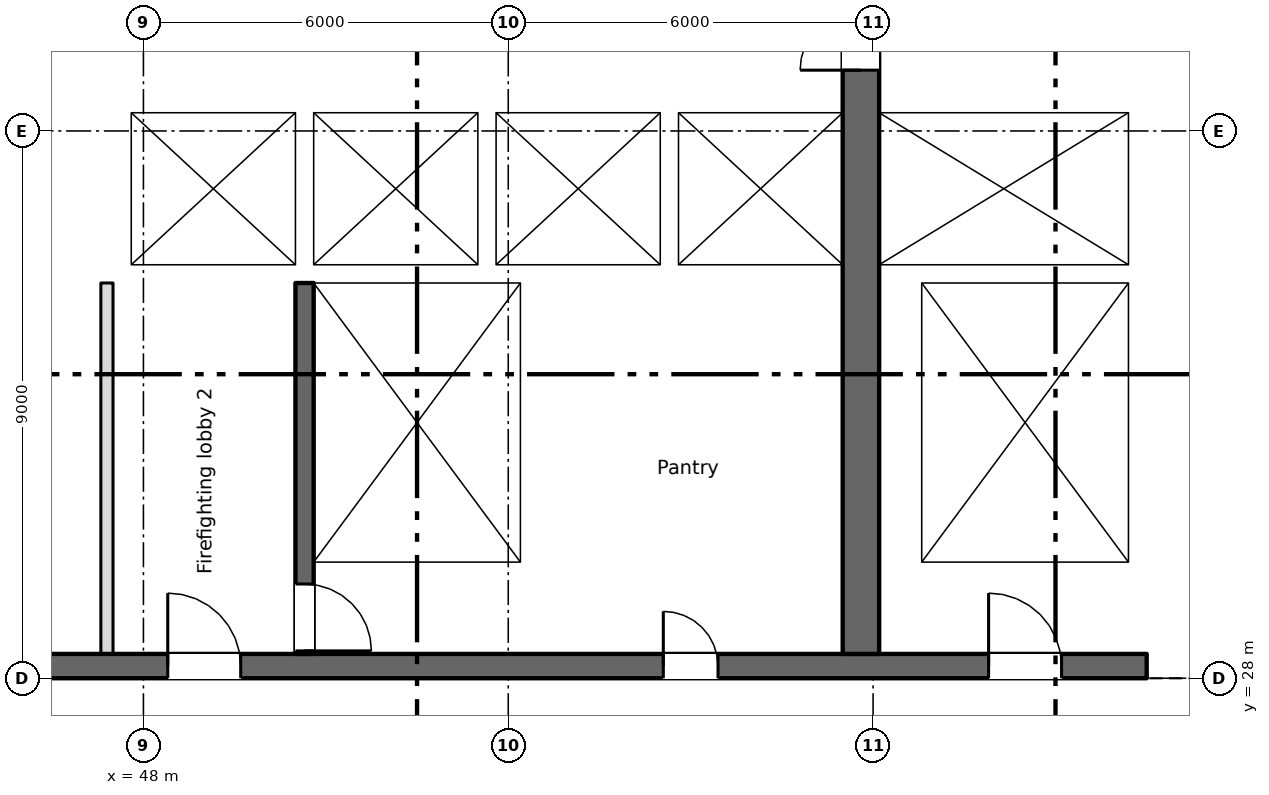
"""IFC4 building model, lengths in metres.
Left out: names, types, materials, properties, quantities, classifications, styles, units other than length and angle.
Written with IfcOpenShell. Run it as: python <this file> out.ifc"""

import sys

from ifc_helpers import new_model, si_unit, direction, frame, frame_2d, origin, place, context, subcontext, project, spatial, rectangle, extrude, element, fill, save


model = new_model("IFC4")
c1 = context("Model", 3, precision=1e-05, world=origin(), true_north=direction((0.0, 1.0)))
c2 = subcontext(c1, "Body", "Model", "MODEL_VIEW")
j1 = project(units=[si_unit("LENGTHUNIT", "METRE"), si_unit("PLANEANGLEUNIT", "RADIAN")], contexts=[c1])
p1 = place(None, origin())
s1 = spatial("IfcSite", under=j1, at=p1, CompositionType="ELEMENT")
p2 = place(p1, origin())
s2 = spatial("IfcBuilding", under=s1, at=p2, CompositionType="ELEMENT")
p3 = place(p2, frame((0.0, 0.0, 258.35)))
s3 = spatial("IfcBuildingStorey", under=s2, at=p3, CompositionType="ELEMENT", Elevation=258.35)
p4 = place(p3, frame((6.5, 28.2, 0.0), z_axis=(0.0, 0.0, 1.0), x_axis=(1.0, 0.0, 0.0)))
e1 = element("IfcWall", 1, at=p4, inside=s3, PredefinedType="SHEAR", context=c2, shape_type="SweptSolid", body=[
    extrude(rectangle(XDim=58.0, YDim=0.4, at=frame_2d((29.0, 0.0))), origin(), (0.0, 0.0, 1.0), 3.4),
])
p5 = place(p4, frame((12.762, 0.0, 0.0)))
e2 = element("IfcOpeningElement", 2, at=p5, cuts=e1, PredefinedType="OPENING", context=c2, shape_type="SweptSolid", body=[
    extrude(rectangle(XDim=0.9, YDim=2.1, at=frame_2d((0.45, 1.05))), frame((0.0, 0.21, 0.0), z_axis=(0.0, -1.0, 0.0), x_axis=(1.0, 0.0, 0.0)), (0.0, 0.0, 1.0), 0.42),
])
p6 = place(p4, frame((15.337, 0.0, 0.0)))
e3 = element("IfcOpeningElement", 3, at=p6, cuts=e1, PredefinedType="OPENING", context=c2, shape_type="SweptSolid", body=[
    extrude(rectangle(XDim=0.9, YDim=2.1, at=frame_2d((0.45, 1.05))), frame((0.0, 0.21, 0.0), z_axis=(0.0, -1.0, 0.0), x_axis=(1.0, 0.0, 0.0)), (0.0, 0.0, 1.0), 0.42),
])
p7 = place(p4, frame((50.05, 0.0, 0.0)))
e4 = element("IfcOpeningElement", 4, at=p7, cuts=e1, PredefinedType="OPENING", context=c2, shape_type="SweptSolid", body=[
    extrude(rectangle(XDim=0.9, YDim=2.1, at=frame_2d((0.45, 1.05))), frame((0.0, 0.21, 0.0), z_axis=(0.0, -1.0, 0.0), x_axis=(1.0, 0.0, 0.0)), (0.0, 0.0, 1.0), 0.42),
])
p8 = place(p4, frame((0.762, 0.0, 0.0)))
e5 = element("IfcOpeningElement", 5, at=p8, cuts=e1, PredefinedType="OPENING", context=c2, shape_type="SweptSolid", body=[
    extrude(rectangle(XDim=0.9, YDim=2.1, at=frame_2d((0.45, 1.05))), frame((0.0, 0.21, 0.0), z_axis=(0.0, -1.0, 0.0), x_axis=(1.0, 0.0, 0.0)), (0.0, 0.0, 1.0), 0.42),
])
p9 = place(p4, frame((2.337, 0.0, 0.0)))
e6 = element("IfcOpeningElement", 6, at=p9, cuts=e1, PredefinedType="OPENING", context=c2, shape_type="SweptSolid", body=[
    extrude(rectangle(XDim=0.9, YDim=2.1, at=frame_2d((0.45, 1.05))), frame((0.0, 0.21, 0.0), z_axis=(0.0, -1.0, 0.0), x_axis=(1.0, 0.0, 0.0)), (0.0, 0.0, 1.0), 0.42),
])
p10 = place(p4, frame((4.9, 0.0, 0.0)))
e7 = element("IfcOpeningElement", 7, at=p10, cuts=e1, PredefinedType="OPENING", context=c2, shape_type="SweptSolid", body=[
    extrude(rectangle(XDim=1.2, YDim=2.1, at=frame_2d((0.6, 1.05))), frame((0.0, 0.21, 0.0), z_axis=(0.0, -1.0, 0.0), x_axis=(1.0, 0.0, 0.0)), (0.0, 0.0, 1.0), 0.42),
])
p11 = place(p4, frame((31.9, 0.0, 0.0)))
e8 = element("IfcOpeningElement", 8, at=p11, cuts=e1, PredefinedType="OPENING", context=c2, shape_type="SweptSolid", body=[
    extrude(rectangle(XDim=1.2, YDim=2.1, at=frame_2d((0.6, 1.05))), frame((0.0, 0.21, 0.0), z_axis=(0.0, -1.0, 0.0), x_axis=(1.0, 0.0, 0.0)), (0.0, 0.0, 1.0), 0.42),
])
p12 = place(p4, frame((55.4, 0.0, 0.0)))
e9 = element("IfcOpeningElement", 9, at=p12, cuts=e1, PredefinedType="OPENING", context=c2, shape_type="SweptSolid", body=[
    extrude(rectangle(XDim=1.2, YDim=2.1, at=frame_2d((0.6, 1.05))), frame((0.0, 0.21, 0.0), z_axis=(0.0, -1.0, 0.0), x_axis=(1.0, 0.0, 0.0)), (0.0, 0.0, 1.0), 0.42),
])
p13 = place(p4, frame((21.9, 0.0, 0.0)))
e10 = element("IfcOpeningElement", 10, at=p13, cuts=e1, PredefinedType="OPENING", context=c2, shape_type="SweptSolid", body=[
    extrude(rectangle(XDim=1.2, YDim=2.1, at=frame_2d((0.6, 1.05))), frame((0.0, 0.21, 0.0), z_axis=(0.0, -1.0, 0.0), x_axis=(1.0, 0.0, 0.0)), (0.0, 0.0, 1.0), 0.42),
])
p14 = place(p4, frame((41.9, 0.0, 0.0)))
e11 = element("IfcOpeningElement", 11, at=p14, cuts=e1, PredefinedType="OPENING", context=c2, shape_type="SweptSolid", body=[
    extrude(rectangle(XDim=1.2, YDim=2.1, at=frame_2d((0.6, 1.05))), frame((0.0, 0.21, 0.0), z_axis=(0.0, -1.0, 0.0), x_axis=(1.0, 0.0, 0.0)), (0.0, 0.0, 1.0), 0.42),
])
p15 = place(p4, frame((25.05, 0.0, 0.0)))
e12 = element("IfcOpeningElement", 12, at=p15, cuts=e1, PredefinedType="OPENING", context=c2, shape_type="SweptSolid", body=[
    extrude(rectangle(XDim=2.4, YDim=2.1, at=frame_2d((1.2, 1.05))), frame((0.0, 0.21, 0.0), z_axis=(0.0, -1.0, 0.0), x_axis=(1.0, 0.0, 0.0)), (0.0, 0.0, 1.0), 0.42),
])
p16 = place(p4, frame((37.55, 0.0, 0.0)))
e13 = element("IfcOpeningElement", 13, at=p16, cuts=e1, PredefinedType="OPENING", context=c2, shape_type="SweptSolid", body=[
    extrude(rectangle(XDim=2.4, YDim=2.1, at=frame_2d((1.2, 1.05))), frame((0.0, 0.21, 0.0), z_axis=(0.0, -1.0, 0.0), x_axis=(1.0, 0.0, 0.0)), (0.0, 0.0, 1.0), 0.42),
])
p17 = place(p4, frame((8.25, 0.0, 0.0)))
e14 = element("IfcOpeningElement", 14, at=p17, cuts=e1, PredefinedType="OPENING", context=c2, shape_type="SweptSolid", body=[
    extrude(rectangle(XDim=2.4, YDim=2.1, at=frame_2d((1.2, 1.05))), frame((0.0, 0.21, 0.0), z_axis=(0.0, -1.0, 0.0), x_axis=(1.0, 0.0, 0.0)), (0.0, 0.0, 1.0), 0.42),
])
p18 = place(p4, frame((29.05, 0.0, 0.0)))
e15 = element("IfcOpeningElement", 15, at=p18, cuts=e1, PredefinedType="OPENING", context=c2, shape_type="SweptSolid", body=[
    extrude(rectangle(XDim=0.9, YDim=2.1, at=frame_2d((0.45, 1.05))), frame((0.0, 0.21, 0.0), z_axis=(0.0, -1.0, 0.0), x_axis=(1.0, 0.0, 0.0)), (0.0, 0.0, 1.0), 0.42),
])
p19 = place(p4, frame((35.05, 0.0, 0.0)))
e16 = element("IfcOpeningElement", 16, at=p19, cuts=e1, PredefinedType="OPENING", context=c2, shape_type="SweptSolid", body=[
    extrude(rectangle(XDim=0.9, YDim=2.1, at=frame_2d((0.45, 1.05))), frame((0.0, 0.21, 0.0), z_axis=(0.0, -1.0, 0.0), x_axis=(1.0, 0.0, 0.0)), (0.0, 0.0, 1.0), 0.42),
])
p20 = place(p3, frame((64.35, 34.8, 0.0), z_axis=(0.0, 0.0, 1.0), x_axis=(0.0, 1.0, 0.0)))
e17 = element("IfcWall", 17, at=p20, inside=s3, PredefinedType="SHEAR", context=c2, shape_type="SweptSolid", body=[
    extrude(rectangle(XDim=6.45, YDim=0.3, at=frame_2d((3.225, 0.0))), origin(), (0.0, 0.0, 1.0), 3.4),
])
p21 = place(p3, frame((59.8, 28.4, 0.0), z_axis=(0.0, 0.0, 1.0), x_axis=(0.0, 1.0, 0.0)))
e18 = element("IfcWall", 18, at=p21, inside=s3, PredefinedType="SHEAR", context=c2, shape_type="SweptSolid", body=[
    extrude(rectangle(XDim=15.1, YDim=0.6, at=frame_2d((7.55, 0.0))), origin(), (0.0, 0.0, 1.0), 3.4),
])
p22 = place(p21, frame((9.6, 0.0, 0.0)))
e19 = element("IfcOpeningElement", 19, at=p22, cuts=e18, PredefinedType="OPENING", context=c2, shape_type="SweptSolid", body=[
    extrude(rectangle(XDim=2.0, YDim=2.1, at=frame_2d((1.0, 1.05))), frame((0.0, 0.31, 0.0), z_axis=(0.0, -1.0, 0.0), x_axis=(1.0, 0.0, 0.0)), (0.0, 0.0, 1.0), 0.62),
])
p23 = place(p3, frame((50.65, 34.5, 0.0), z_axis=(0.0, 0.0, 1.0), x_axis=(0.0, -1.0, 0.0)))
e20 = element("IfcWall", 20, at=p23, inside=s3, PredefinedType="SHEAR", context=c2, shape_type="SweptSolid", body=[
    extrude(rectangle(XDim=6.1, YDim=0.3, at=frame_2d((3.05, 0.0))), origin(), (0.0, 0.0, 1.0), 3.4),
])
p24 = place(p23, frame((4.95, 0.0, 0.0)))
e21 = element("IfcOpeningElement", 21, at=p24, cuts=e20, PredefinedType="OPENING", context=c2, shape_type="SweptSolid", body=[
    extrude(rectangle(XDim=1.1, YDim=2.1, at=frame_2d((0.55, 1.05))), frame((0.0, 0.16, 0.0), z_axis=(0.0, -1.0, 0.0), x_axis=(1.0, 0.0, 0.0)), (0.0, 0.0, 1.0), 0.32),
])
p25 = place(p3, frame((54.35, 28.4, 0.0), z_axis=(0.0, 0.0, 1.0), x_axis=(0.0, 1.0, 0.0)))
e22 = element("IfcWall", 22, at=p25, inside=s3, PredefinedType="SHEAR", context=c2, shape_type="SweptSolid", body=[
    extrude(rectangle(XDim=6.1, YDim=0.3, at=frame_2d((3.05, 0.0))), origin(), (0.0, 0.0, 1.0), 3.4),
])
p26 = place(p3, frame((60.45, 28.4, 0.0), z_axis=(0.0, 0.0, 1.0), x_axis=(0.0, 1.0, 0.0)))
e23 = element("IfcWall", 23, at=p26, inside=s3, PredefinedType="SHEAR", context=c2, shape_type="SweptSolid", body=[
    extrude(rectangle(XDim=6.1, YDim=0.7, at=frame_2d((3.05, 0.0))), origin(), (0.0, 0.0, 1.0), 3.4),
])
p27 = place(p3, frame((64.35, 28.4, 0.0), z_axis=(0.0, 0.0, 1.0), x_axis=(0.0, 1.0, 0.0)))
e24 = element("IfcWall", 24, at=p27, inside=s3, PredefinedType="SHEAR", context=c2, shape_type="SweptSolid", body=[
    extrude(rectangle(XDim=6.1, YDim=0.3, at=frame_2d((3.05, 0.0))), origin(), (0.0, 0.0, 1.0), 3.4),
])
p28 = place(p3, frame((47.3, 34.65, 0.0), z_axis=(0.0, 0.0, 1.0), x_axis=(1.0, 0.0, 0.0)))
e25 = element("IfcWall", 25, at=p28, inside=s3, PredefinedType="SHEAR", context=c2, shape_type="SweptSolid", body=[
    extrude(rectangle(XDim=12.2, YDim=0.3, at=frame_2d((6.1, 0.0))), origin(), (0.0, 0.0, 1.0), 3.4),
])
p29 = place(p28, frame((1.3, 0.0, 0.0)))
e26 = element("IfcOpeningElement", 26, at=p29, cuts=e25, PredefinedType="OPENING", context=c2, shape_type="SweptSolid", body=[
    extrude(rectangle(XDim=1.1, YDim=2.1, at=frame_2d((0.55, 1.05))), frame((0.0, 0.16, 0.0), z_axis=(0.0, -1.0, 0.0), x_axis=(1.0, 0.0, 0.0)), (0.0, 0.0, 1.0), 0.32),
])
p30 = place(p3, frame((60.1, 34.65, 0.0), z_axis=(0.0, 0.0, 1.0), x_axis=(1.0, 0.0, 0.0)))
e27 = element("IfcWall", 27, at=p30, inside=s3, PredefinedType="SHEAR", context=c2, shape_type="SweptSolid", body=[
    extrude(rectangle(XDim=4.4, YDim=0.3, at=frame_2d((2.2, 0.0))), origin(), (0.0, 0.0, 1.0), 3.4),
])
p31 = place(p3, frame((47.3, 37.45, 0.0), z_axis=(0.0, 0.0, 1.0), x_axis=(1.0, 0.0, 0.0)))
e28 = element("IfcWall", 28, at=p31, inside=s3, PredefinedType="SHEAR", context=c2, shape_type="SweptSolid", body=[
    extrude(rectangle(XDim=12.2, YDim=0.3, at=frame_2d((6.1, 0.0))), origin(), (0.0, 0.0, 1.0), 3.4),
])
p32 = place(p31, frame((4.3, 0.0, 0.0)))
e29 = element("IfcOpeningElement", 29, at=p32, cuts=e28, PredefinedType="OPENING", context=c2, shape_type="SweptSolid", body=[
    extrude(rectangle(XDim=1.1, YDim=2.1, at=frame_2d((0.55, 1.05))), frame((0.0, 0.16, 0.0), z_axis=(0.0, -1.0, 0.0), x_axis=(1.0, 0.0, 0.0)), (0.0, 0.0, 1.0), 0.32),
])
p33 = place(p31, frame((7.3, 0.0, 0.0)))
e30 = element("IfcOpeningElement", 30, at=p33, cuts=e28, PredefinedType="OPENING", context=c2, shape_type="SweptSolid", body=[
    extrude(rectangle(XDim=1.1, YDim=2.1, at=frame_2d((0.55, 1.05))), frame((0.0, 0.16, 0.0), z_axis=(0.0, -1.0, 0.0), x_axis=(1.0, 0.0, 0.0)), (0.0, 0.0, 1.0), 0.32),
])
p34 = place(p31, frame((10.3, 0.0, 0.0)))
e31 = element("IfcOpeningElement", 31, at=p34, cuts=e28, PredefinedType="OPENING", context=c2, shape_type="SweptSolid", body=[
    extrude(rectangle(XDim=1.1, YDim=2.1, at=frame_2d((0.55, 1.05))), frame((0.0, 0.16, 0.0), z_axis=(0.0, -1.0, 0.0), x_axis=(1.0, 0.0, 0.0)), (0.0, 0.0, 1.0), 0.32),
])
p35 = place(p3, frame((60.1, 37.45, 0.0), z_axis=(0.0, 0.0, 1.0), x_axis=(1.0, 0.0, 0.0)))
e32 = element("IfcWall", 32, at=p35, inside=s3, PredefinedType="SHEAR", context=c2, shape_type="SweptSolid", body=[
    extrude(rectangle(XDim=4.1, YDim=0.3, at=frame_2d((2.05, 0.0))), origin(), (0.0, 0.0, 1.0), 3.4),
])
p36 = place(p35, frame((1.5, 0.0, 0.0)))
e33 = element("IfcOpeningElement", 33, at=p36, cuts=e32, PredefinedType="OPENING", context=c2, shape_type="SweptSolid", body=[
    extrude(rectangle(XDim=1.1, YDim=2.1, at=frame_2d((0.55, 1.05))), frame((0.0, 0.16, 0.0), z_axis=(0.0, -1.0, 0.0), x_axis=(1.0, 0.0, 0.0)), (0.0, 0.0, 1.0), 0.32),
])
p37 = place(p3, frame((47.55, 34.8, 0.0), z_axis=(0.0, 0.0, 1.0), x_axis=(0.0, 1.0, 0.0)))
e34 = element("IfcWall", 34, at=p37, inside=s3, PredefinedType="SHEAR", context=c2, shape_type="SweptSolid", body=[
    extrude(rectangle(XDim=2.5, YDim=0.5, at=frame_2d((1.25, 0.0))), origin(), (0.0, 0.0, 1.0), 3.4),
])
for number, where, z_axis, x_axis in (
    (35, (50.65, 34.8, 0.0), (0.0, 0.0, 1.0), (0.0, 1.0, 0.0)),
    (36, (53.65, 34.8, 0.0), (0.0, 0.0, 1.0), (0.0, 1.0, 0.0)),
    (37, (56.65, 34.8, 0.0), (0.0, 0.0, 1.0), (0.0, 1.0, 0.0)),
):
    element("IfcWall", number, at=place(p3, frame(where, z_axis=z_axis, x_axis=x_axis)), inside=s3, PredefinedType="SHEAR", context=c2, shape_type="SweptSolid", body=[
        extrude(rectangle(XDim=2.5, YDim=0.3, at=frame_2d((1.25, 0.0))), origin(), (0.0, 0.0, 1.0), 3.4),
    ])
p38 = place(p3, frame((47.4, 28.4, 0.0), z_axis=(0.0, 0.0, 1.0), x_axis=(0.0, 1.0, 0.0)))
e38 = element("IfcWall", 38, at=p38, inside=s3, PredefinedType="PARTITIONING", context=c2, shape_type="SweptSolid", body=[
    extrude(rectangle(XDim=6.1, YDim=0.2, at=frame_2d((3.05, 0.0))), origin(), (0.0, 0.0, 1.0), 3.4),
])
p39 = place(p7, origin())
e39 = element("IfcDoor", 39, at=p39, inside=s3, OperationType="SINGLE_SWING_LEFT", PredefinedType="DOOR", context=c2, shape_type="SweptSolid", body=[
    extrude(rectangle(XDim=0.9, YDim=2.1, at=frame_2d((0.45, 1.05))), frame((0.0, 0.025, 0.0), z_axis=(0.0, -1.0, 0.0), x_axis=(1.0, 0.0, 0.0)), (0.0, 0.0, 1.0), 0.05),
])
fill(e4, e39)
p40 = place(p32, origin())
e40 = element("IfcDoor", 40, at=p40, inside=s3, OperationType="SLIDING_TO_LEFT", PredefinedType="DOOR", context=c2, shape_type="SweptSolid", body=[
    extrude(rectangle(XDim=1.1, YDim=2.1, at=frame_2d((0.55, 1.05))), frame((0.0, 0.025, 0.0), z_axis=(0.0, -1.0, 0.0), x_axis=(1.0, 0.0, 0.0)), (0.0, 0.0, 1.0), 0.05),
])
fill(e29, e40)
p41 = place(p33, origin())
e41 = element("IfcDoor", 41, at=p41, inside=s3, OperationType="SLIDING_TO_LEFT", PredefinedType="DOOR", context=c2, shape_type="SweptSolid", body=[
    extrude(rectangle(XDim=1.1, YDim=2.1, at=frame_2d((0.55, 1.05))), frame((0.0, 0.025, 0.0), z_axis=(0.0, -1.0, 0.0), x_axis=(1.0, 0.0, 0.0)), (0.0, 0.0, 1.0), 0.05),
])
fill(e30, e41)
p42 = place(p34, origin())
e42 = element("IfcDoor", 42, at=p42, inside=s3, OperationType="SLIDING_TO_LEFT", PredefinedType="DOOR", context=c2, shape_type="SweptSolid", body=[
    extrude(rectangle(XDim=1.1, YDim=2.1, at=frame_2d((0.55, 1.05))), frame((0.0, 0.025, 0.0), z_axis=(0.0, -1.0, 0.0), x_axis=(1.0, 0.0, 0.0)), (0.0, 0.0, 1.0), 0.05),
])
fill(e31, e42)
p43 = place(p36, origin())
e43 = element("IfcDoor", 43, at=p43, inside=s3, OperationType="SLIDING_TO_LEFT", PredefinedType="DOOR", context=c2, shape_type="SweptSolid", body=[
    extrude(rectangle(XDim=1.1, YDim=2.1, at=frame_2d((0.55, 1.05))), frame((0.0, 0.025, 0.0), z_axis=(0.0, -1.0, 0.0), x_axis=(1.0, 0.0, 0.0)), (0.0, 0.0, 1.0), 0.05),
])
fill(e33, e43)
p44 = place(p29, origin())
e44 = element("IfcDoor", 44, at=p44, inside=s3, OperationType="SLIDING_TO_LEFT", PredefinedType="DOOR", context=c2, shape_type="SweptSolid", body=[
    extrude(rectangle(XDim=1.1, YDim=2.1, at=frame_2d((0.55, 1.05))), frame((0.0, 0.025, 0.0), z_axis=(0.0, -1.0, 0.0), x_axis=(1.0, 0.0, 0.0)), (0.0, 0.0, 1.0), 0.05),
])
fill(e26, e44)
p45 = place(p24, origin())
e45 = element("IfcDoor", 45, at=p45, inside=s3, OperationType="SINGLE_SWING_RIGHT", PredefinedType="DOOR", context=c2, shape_type="SweptSolid", body=[
    extrude(rectangle(XDim=1.1, YDim=2.1, at=frame_2d((0.55, 1.05))), frame((0.0, 0.025, 0.0), z_axis=(0.0, -1.0, 0.0), x_axis=(1.0, 0.0, 0.0)), (0.0, 0.0, 1.0), 0.05),
])
fill(e21, e45)
p46 = place(p12, origin())
e46 = element("IfcDoor", 46, at=p46, inside=s3, OperationType="SINGLE_SWING_LEFT", PredefinedType="DOOR", context=c2, shape_type="SweptSolid", body=[
    extrude(rectangle(XDim=1.2, YDim=2.1, at=frame_2d((0.6, 1.05))), frame((0.0, 0.025, 0.0), z_axis=(0.0, -1.0, 0.0), x_axis=(1.0, 0.0, 0.0)), (0.0, 0.0, 1.0), 0.05),
])
fill(e9, e46)
p47 = place(p14, origin())
e47 = element("IfcDoor", 47, at=p47, inside=s3, OperationType="SINGLE_SWING_LEFT", PredefinedType="DOOR", context=c2, shape_type="SweptSolid", body=[
    extrude(rectangle(XDim=1.2, YDim=2.1, at=frame_2d((0.6, 1.05))), frame((0.0, 0.025, 0.0), z_axis=(0.0, -1.0, 0.0), x_axis=(1.0, 0.0, 0.0)), (0.0, 0.0, 1.0), 0.05),
])
fill(e11, e47)
p48 = place(p22, origin())
e48 = element("IfcDoor", 48, at=p48, inside=s3, OperationType="DOUBLE_DOOR_SINGLE_SWING", PredefinedType="DOOR", context=c2, shape_type="SweptSolid", body=[
    extrude(rectangle(XDim=2.0, YDim=2.1, at=frame_2d((1.0, 1.05))), frame((0.0, 0.025, 0.0), z_axis=(0.0, -1.0, 0.0), x_axis=(1.0, 0.0, 0.0)), (0.0, 0.0, 1.0), 0.05),
])
fill(e19, e48)
save(model, sys.argv[1])
